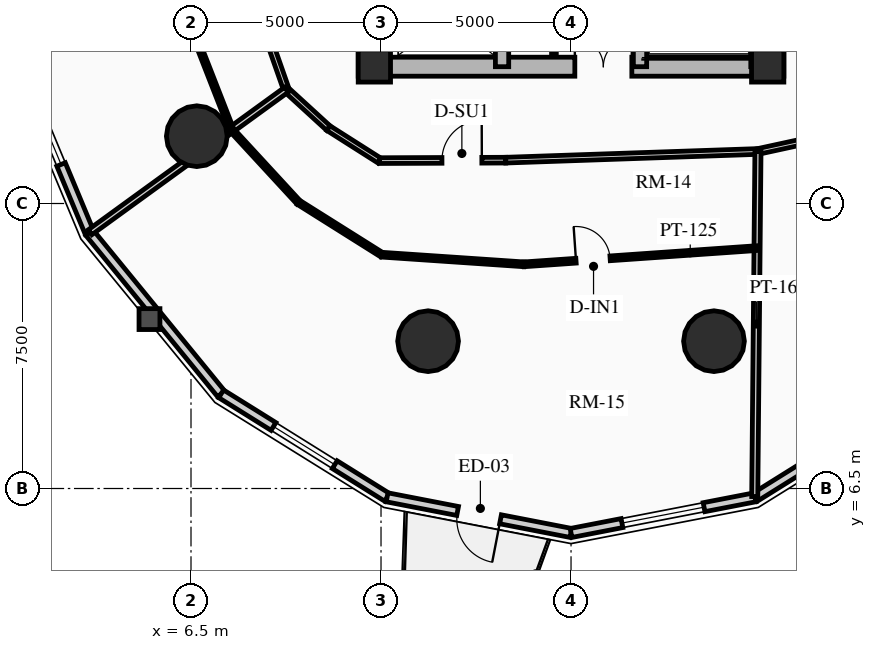
"""IFC4 building model, lengths in metres.
Left out: names, types, materials, properties, quantities, classifications, styles, units other than length and angle.
Written with IfcOpenShell. Run it as: python <this file> out.ifc"""

import sys

from ifc_helpers import new_model, si_unit, direction, frame, frame_2d, origin, origin_2d, place, context, subcontext, project, spatial, rectangle, circle, extrude, source, transform, mapped, element, fill, save


model = new_model("IFC4")
c1 = context("Model", 3, precision=1e-05, world=origin(), true_north=direction((0.0, 1.0)))
c2 = subcontext(c1, "Body", "Model", "MODEL_VIEW")
j1 = project(units=[si_unit("LENGTHUNIT", "METRE"), si_unit("PLANEANGLEUNIT", "RADIAN")], contexts=[c1])
p1 = place(None, origin())
s1 = spatial("IfcSite", under=j1, at=p1, CompositionType="ELEMENT")
p2 = place(p1, origin())
s2 = spatial("IfcBuilding", under=s1, at=p2, CompositionType="ELEMENT")
p3 = place(p2, frame((0.0, 0.0, 59.83)))
s3 = spatial("IfcBuildingStorey", under=s2, at=p3, CompositionType="ELEMENT", Elevation=59.83)
for number, where, z_axis, x_axis in (
    (1, (11.15, 17.35, 0.0), (0.0, 0.0, 1.0), (0.0, 1.0, 0.0)),
    (2, (21.85, 17.35, 0.0), (0.0, 0.0, 1.0), (0.0, 1.0, 0.0)),
):
    element("IfcWall", number, at=place(p3, frame(where, z_axis=z_axis, x_axis=x_axis)), inside=s3, PredefinedType="SHEAR", context=c2, shape_type="SweptSolid", body=[
        extrude(rectangle(XDim=14.3, YDim=0.5, at=frame_2d((7.15, 0.0))), origin(), (0.0, 0.0, 1.0), 2.91),
    ])
p4 = place(p3, frame((11.15, 17.6, 0.0), z_axis=(0.0, 0.0, 1.0), x_axis=(1.0, 0.0, 0.0)))
e3 = element("IfcWall", 3, at=p4, inside=s3, PredefinedType="SHEAR", context=c2, shape_type="SweptSolid", body=[
    extrude(rectangle(XDim=10.7, YDim=0.5, at=frame_2d((5.35, 0.0))), origin(), (0.0, 0.0, 1.0), 2.91),
])
m1 = source(origin(), c2, "Body", "SweptSolid", [
    extrude(rectangle(XDim=1.5, YDim=2.02, at=frame_2d((0.75, 1.01))), frame((0.0, 0.26, 0.0), z_axis=(0.0, -1.0, 0.0), x_axis=(1.0, 0.0, 0.0)), (0.0, 0.0, 1.0), 0.52),
])
p5 = place(p4, frame((5.45, 0.0, 0.0)))
e4 = element("IfcOpeningElement", 4, at=p5, cuts=e3, PredefinedType="OPENING", context=c2, shape_type="MappedRepresentation", body=[
    mapped(m1, transform((0.0, 0.0, 0.0), x_axis=(1.0, 0.0, 0.0), y_axis=(0.0, 1.0, 0.0), z_axis=(0.0, 0.0, 1.0), scale=1.0)),
])
p6 = place(p3, frame((14.685, 17.6, 0.0), z_axis=(0.0, 0.0, 1.0), x_axis=(0.0, 1.0, 0.0)))
e5 = element("IfcWall", 5, at=p6, inside=s3, PredefinedType="SHEAR", context=c2, shape_type="SweptSolid", body=[
    extrude(rectangle(XDim=13.8, YDim=0.35, at=frame_2d((6.9, 0.0))), origin(), (0.0, 0.0, 1.0), 2.91),
])
m2 = source(origin(), c2, "Body", "SweptSolid", [
    extrude(rectangle(XDim=1.1, YDim=2.015, at=frame_2d((0.55, 1.007))), frame((0.0, 0.185, 0.0), z_axis=(0.0, -1.0, 0.0), x_axis=(1.0, 0.0, 0.0)), (0.0, 0.0, 1.0), 0.37),
])
p7 = place(p6, frame((4.9, 0.0, 0.0)))
e6 = element("IfcOpeningElement", 6, at=p7, cuts=e5, PredefinedType="OPENING", context=c2, shape_type="MappedRepresentation", body=[
    mapped(m2, transform((0.0, 0.0, 0.0), x_axis=(1.0, 0.0, 0.0), y_axis=(0.0, 1.0, 0.0), z_axis=(0.0, 0.0, 1.0), scale=1.0)),
])
m3 = source(origin(), c2, "Body", "SweptSolid", [
    extrude(rectangle(XDim=1.15, YDim=2.02, at=frame_2d((0.575, 1.01))), frame((0.0, 0.185, 0.0), z_axis=(0.0, -1.0, 0.0), x_axis=(1.0, 0.0, 0.0)), (0.0, 0.0, 1.0), 0.37),
])
p8 = place(p6, frame((7.32, 0.0, 0.0)))
e7 = element("IfcOpeningElement", 7, at=p8, cuts=e5, PredefinedType="OPENING", context=c2, shape_type="MappedRepresentation", body=[
    mapped(m3, transform((0.0, 0.0, 0.0), x_axis=(1.0, 0.0, 0.0), y_axis=(0.0, 1.0, 0.0), z_axis=(0.0, 0.0, 1.0), scale=1.0)),
])
p9 = place(p3, frame((18.315, 17.6, 0.0), z_axis=(0.0, 0.0, 1.0), x_axis=(0.0, 1.0, 0.0)))
e8 = element("IfcWall", 8, at=p9, inside=s3, PredefinedType="SHEAR", context=c2, shape_type="SweptSolid", body=[
    extrude(rectangle(XDim=13.8, YDim=0.35, at=frame_2d((6.9, 0.0))), origin(), (0.0, 0.0, 1.0), 2.91),
])
p10 = place(p9, frame((10.025, 0.0, 0.0)))
e9 = element("IfcOpeningElement", 9, at=p10, cuts=e8, PredefinedType="OPENING", context=c2, shape_type="MappedRepresentation", body=[
    mapped(m2, transform((0.0, 0.0, 0.0), x_axis=(1.0, 0.0, 0.0), y_axis=(0.0, 1.0, 0.0), z_axis=(0.0, 0.0, 1.0), scale=1.0)),
])
p11 = place(p9, frame((12.025, 0.0, 0.0)))
e10 = element("IfcOpeningElement", 10, at=p11, cuts=e8, PredefinedType="OPENING", context=c2, shape_type="MappedRepresentation", body=[
    mapped(m2, transform((0.0, 0.0, 0.0), x_axis=(1.0, 0.0, 0.0), y_axis=(0.0, 1.0, 0.0), z_axis=(0.0, 0.0, 1.0), scale=1.0)),
])
p12 = place(p9, frame((5.33, 0.0, 0.0)))
e11 = element("IfcOpeningElement", 11, at=p12, cuts=e8, PredefinedType="OPENING", context=c2, shape_type="MappedRepresentation", body=[
    mapped(m3, transform((0.0, 0.0, 0.0), x_axis=(1.0, 0.0, 0.0), y_axis=(0.0, 1.0, 0.0), z_axis=(0.0, 0.0, 1.0), scale=1.0)),
])
p13 = place(p3, frame((21.405, 17.6, 0.0), z_axis=(0.0, 0.0, 1.0), x_axis=(0.0, 1.0, 0.0)))
e12 = element("IfcWall", 12, at=p13, inside=s3, PredefinedType="SHEAR", context=c2, shape_type="SweptSolid", body=[
    extrude(rectangle(XDim=6.745, YDim=0.35, at=frame_2d((3.373, 0.0))), origin(), (0.0, 0.0, 1.0), 2.91),
])
for number, where, z_axis, x_axis in (
    (13, (11.325, 17.62, 0.0), (0.0, 0.0, 1.0), (1.0, 0.0, 0.0)),
    (14, (21.675, 17.62, 0.0), (0.0, 0.0, 1.0), (1.0, 0.0, 0.0)),
):
    element("IfcColumn", number, at=place(p3, frame(where, z_axis=z_axis, x_axis=x_axis)), inside=s3, PredefinedType="COLUMN", context=c2, shape_type="SweptSolid", body=[
        extrude(rectangle(XDim=0.85, YDim=0.85, at=origin_2d()), origin(), (0.0, 0.0, 1.0), 2.91),
    ])
for number, where, z_axis, x_axis in (
    (15, (6.653, 15.771, 0.0), (0.0, 0.0, 1.0), (1.0, 0.0, 0.0)),
    (16, (12.739, 10.377, 0.0), (0.0, 0.0, 1.0), (1.0, 0.0, 0.0)),
    (17, (20.261, 10.377, 0.0), (0.0, 0.0, 1.0), (1.0, 0.0, 0.0)),
):
    element("IfcColumn", number, at=place(p3, frame(where, z_axis=z_axis, x_axis=x_axis)), inside=s3, PredefinedType="USERDEFINED", context=c2, shape_type="SweptSolid", body=[
        extrude(circle(Radius=0.8, at=origin_2d()), origin(), (0.0, 0.0, 1.0), 2.91),
    ])
p14 = place(p3, frame((3.828, 13.232, 0.0), z_axis=(0.0, 0.0, 1.0), x_axis=(-0.384348836956, 0.923187939442, 0.0)))
e18 = element("IfcWall", 18, at=p14, inside=s3, PredefinedType="SOLIDWALL", context=c2, shape_type="SweptSolid", body=[
    extrude(rectangle(XDim=5.789, YDim=0.24, at=frame_2d((2.894, 0.0))), origin(), (0.0, 0.0, 1.0), 2.073),
])
m4 = source(origin(), c2, "Body", "SweptSolid", [
    extrude(rectangle(XDim=1.9, YDim=1.35, at=frame_2d((0.95, 0.675))), frame((0.0, 0.13, 0.0), z_axis=(0.0, -1.0, 0.0), x_axis=(1.0, 0.0, 0.0)), (0.0, 0.0, 1.0), 0.26),
])
p15 = place(p14, frame((1.944, 0.0, 0.65)))
e19 = element("IfcOpeningElement", 19, at=p15, cuts=e18, PredefinedType="OPENING", context=c2, shape_type="MappedRepresentation", body=[
    mapped(m4, transform((0.0, 0.0, 0.0), x_axis=(1.0, 0.0, 0.0), y_axis=(0.0, 1.0, 0.0), z_axis=(0.0, 0.0, 1.0), scale=1.0)),
])
p16 = place(p3, frame((7.293, 8.991, 0.0), z_axis=(0.0, 0.0, 1.0), x_axis=(-0.632713287022, 0.77438614168, 0.0)))
e20 = element("IfcWall", 20, at=p16, inside=s3, PredefinedType="SOLIDWALL", context=c2, shape_type="SweptSolid", body=[
    extrude(rectangle(XDim=5.477, YDim=0.24, at=frame_2d((2.738, 0.0))), origin(), (0.0, 0.0, 1.0), 2.073),
])
p17 = place(p3, frame((11.66, 6.268, 0.0), z_axis=(0.0, 0.0, 1.0), x_axis=(-0.848533613342, 0.529141481107, 0.0)))
e21 = element("IfcWall", 21, at=p17, inside=s3, PredefinedType="SOLIDWALL", context=c2, shape_type="SweptSolid", body=[
    extrude(rectangle(XDim=5.146, YDim=0.24, at=frame_2d((2.573, 0.0))), origin(), (0.0, 0.0, 1.0), 2.073),
])
p18 = place(p17, frame((1.623, 0.0, 0.65)))
e22 = element("IfcOpeningElement", 22, at=p18, cuts=e21, PredefinedType="OPENING", context=c2, shape_type="MappedRepresentation", body=[
    mapped(m4, transform((0.0, 0.0, 0.0), x_axis=(1.0, 0.0, 0.0), y_axis=(0.0, 1.0, 0.0), z_axis=(0.0, 0.0, 1.0), scale=1.0)),
])
p19 = place(p3, frame((16.5, 5.33, 0.0), z_axis=(0.0, 0.0, 1.0), x_axis=(-0.981725274071, 0.190303668512, 0.0)))
e23 = element("IfcWall", 23, at=p19, inside=s3, PredefinedType="SOLIDWALL", context=c2, shape_type="SweptSolid", body=[
    extrude(rectangle(XDim=4.93, YDim=0.24, at=frame_2d((2.465, 0.0))), origin(), (0.0, 0.0, 1.0), 2.073),
])
m5 = source(origin(), c2, "Body", "SweptSolid", [
    extrude(rectangle(XDim=1.15, YDim=2.005, at=frame_2d((0.575, 1.002))), frame((0.0, 0.13, 0.0), z_axis=(0.0, -1.0, 0.0), x_axis=(1.0, 0.0, 0.0)), (0.0, 0.0, 1.0), 0.26),
])
p20 = place(p19, frame((1.89, 0.0, 0.0)))
e24 = element("IfcOpeningElement", 24, at=p20, cuts=e23, PredefinedType="OPENING", context=c2, shape_type="MappedRepresentation", body=[
    mapped(m5, transform((0.0, 0.0, 0.0), x_axis=(1.0, 0.0, 0.0), y_axis=(0.0, 1.0, 0.0), z_axis=(0.0, 0.0, 1.0), scale=1.0)),
])
p21 = place(p3, frame((21.34, 6.268, 0.0), z_axis=(0.0, 0.0, 1.0), x_axis=(-0.981725274071, -0.190303668512, 0.0)))
e25 = element("IfcWall", 25, at=p21, inside=s3, PredefinedType="SOLIDWALL", context=c2, shape_type="SweptSolid", body=[
    extrude(rectangle(XDim=4.93, YDim=0.24, at=frame_2d((2.465, 0.0))), origin(), (0.0, 0.0, 1.0), 2.073),
])
m6 = source(origin(), c2, "Body", "SweptSolid", [
    extrude(rectangle(XDim=2.2, YDim=1.35, at=frame_2d((1.1, 0.675))), frame((0.0, 0.13, 0.0), z_axis=(0.0, -1.0, 0.0), x_axis=(1.0, 0.0, 0.0)), (0.0, 0.0, 1.0), 0.26),
])
p22 = place(p21, frame((1.365, 0.0, 0.65)))
e26 = element("IfcOpeningElement", 26, at=p22, cuts=e25, PredefinedType="OPENING", context=c2, shape_type="MappedRepresentation", body=[
    mapped(m6, transform((0.0, 0.0, 0.0), x_axis=(1.0, 0.0, 0.0), y_axis=(0.0, 1.0, 0.0), z_axis=(0.0, 0.0, 1.0), scale=1.0)),
])
p23 = place(p3, frame((25.707, 8.991, 0.0), z_axis=(0.0, 0.0, 1.0), x_axis=(-0.848533613342, -0.529141481107, 0.0)))
e27 = element("IfcWall", 27, at=p23, inside=s3, PredefinedType="SOLIDWALL", context=c2, shape_type="SweptSolid", body=[
    extrude(rectangle(XDim=5.146, YDim=0.24, at=frame_2d((2.573, 0.0))), origin(), (0.0, 0.0, 1.0), 2.073),
])
p24 = place(p3, frame((16.05, 17.92, 0.0), z_axis=(0.0, 0.0, 1.0), x_axis=(0.0, 1.0, 0.0)))
e28 = element("IfcWall", 28, at=p24, inside=s3, PredefinedType="PARTITIONING", context=c2, shape_type="SweptSolid", body=[
    extrude(rectangle(XDim=1.8, YDim=0.125, at=frame_2d((0.9, 0.0))), origin(), (0.0, 0.0, 1.0), 2.635),
])
m7 = source(origin(), c2, "Body", "SweptSolid", [
    extrude(rectangle(XDim=0.9, YDim=2.005, at=frame_2d((0.45, 1.002))), frame((0.0, 0.073, 0.0), z_axis=(0.0, -1.0, 0.0), x_axis=(1.0, 0.0, 0.0)), (0.0, 0.0, 1.0), 0.145),
])
p25 = place(p24, frame((0.42, 0.0, 0.0)))
e29 = element("IfcOpeningElement", 29, at=p25, cuts=e28, PredefinedType="OPENING", context=c2, shape_type="MappedRepresentation", body=[
    mapped(m7, transform((0.0, 0.0, 0.0), x_axis=(1.0, 0.0, 0.0), y_axis=(0.0, 1.0, 0.0), z_axis=(0.0, 0.0, 1.0), scale=1.0)),
])
p26 = place(p3, frame((8.538, 18.338, 0.0), z_axis=(0.0, 0.0, 1.0), x_axis=(0.331358150167, -0.94350504838, 0.0)))
e30 = element("IfcWall", 30, at=p26, inside=s3, PredefinedType="PARTITIONING", context=c2, shape_type="SweptSolid", body=[
    extrude(rectangle(XDim=1.424, YDim=0.15, at=frame_2d((0.712, 0.0))), origin(), (0.0, 0.0, 1.0), 2.205),
])
p27 = place(p3, frame((9.01, 16.994, 0.0), z_axis=(0.0, 0.0, 1.0), x_axis=(0.737701798986, -0.67512669609, 0.0)))
e31 = element("IfcWall", 31, at=p27, inside=s3, PredefinedType="PARTITIONING", context=c2, shape_type="SweptSolid", body=[
    extrude(rectangle(XDim=1.498, YDim=0.15, at=frame_2d((0.749, 0.0))), origin(), (0.0, 0.0, 1.0), 2.159),
])
p28 = place(p3, frame((10.115, 15.983, 0.0), z_axis=(0.0, 0.0, 1.0), x_axis=(0.843995849351, -0.536349705209, 0.0)))
e32 = element("IfcWall", 32, at=p28, inside=s3, PredefinedType="PARTITIONING", context=c2, shape_type="SweptSolid", body=[
    extrude(rectangle(XDim=1.593, YDim=0.15, at=frame_2d((0.796, 0.0))), origin(), (0.0, 0.0, 1.0), 2.205),
])
p29 = place(p3, frame((11.46, 15.129, 0.0), z_axis=(0.0, 0.0, 1.0), x_axis=(0.999993513287, 0.003601858435, 0.0)))
e33 = element("IfcWall", 33, at=p29, inside=s3, PredefinedType="PARTITIONING", context=c2, shape_type="SweptSolid", body=[
    extrude(rectangle(XDim=3.321, YDim=0.15, at=frame_2d((1.661, 0.0))), origin(), (0.0, 0.0, 1.0), 2.159),
])
m8 = source(origin(), c2, "Body", "SweptSolid", [
    extrude(rectangle(XDim=1.05, YDim=2.015, at=frame_2d((0.525, 1.007))), frame((0.0, 0.085, 0.0), z_axis=(0.0, -1.0, 0.0), x_axis=(1.0, 0.0, 0.0)), (0.0, 0.0, 1.0), 0.17),
])
p30 = place(p29, frame((1.643, 0.0, 0.0)))
e34 = element("IfcOpeningElement", 34, at=p30, cuts=e33, PredefinedType="OPENING", context=c2, shape_type="MappedRepresentation", body=[
    mapped(m8, transform((0.0, 0.0, 0.0), x_axis=(1.0, 0.0, 0.0), y_axis=(0.0, 1.0, 0.0), z_axis=(0.0, 0.0, 1.0), scale=1.0)),
])
p31 = place(p3, frame((14.781, 15.141, 0.0), z_axis=(0.0, 0.0, 1.0), x_axis=(0.999407918707, 0.034406569513, 0.0)))
e35 = element("IfcWall", 35, at=p31, inside=s3, PredefinedType="PARTITIONING", context=c2, shape_type="SweptSolid", body=[
    extrude(rectangle(XDim=6.642, YDim=0.15, at=frame_2d((3.321, 0.0))), origin(), (0.0, 0.0, 1.0), 2.159),
])
p32 = place(p3, frame((21.419, 15.369, 0.0), z_axis=(0.0, 0.0, 1.0), x_axis=(0.977192701953, 0.212354475464, 0.0)))
e36 = element("IfcWall", 36, at=p32, inside=s3, PredefinedType="PARTITIONING", context=c2, shape_type="SweptSolid", body=[
    extrude(rectangle(XDim=1.888, YDim=0.15, at=frame_2d((0.944, 0.0))), origin(), (0.0, 0.0, 1.0), 2.205),
])
p33 = place(p3, frame((9.01, 16.994, 0.0), z_axis=(0.0, 0.0, 1.0), x_axis=(-0.809215422166, -0.58751204288, 0.0)))
e37 = element("IfcWall", 37, at=p33, inside=s3, PredefinedType="PARTITIONING", context=c2, shape_type="SweptSolid", body=[
    extrude(rectangle(XDim=6.384, YDim=0.16, at=frame_2d((3.192, 0.0))), origin(), (0.0, 0.0, 1.0), 2.073),
])
p34 = place(p3, frame((21.419, 15.369, 0.0), z_axis=(0.0, 0.0, 1.0), x_axis=(-0.009327801925, -0.999956495109, 0.0)))
e38 = element("IfcWall", 38, at=p34, inside=s3, PredefinedType="PARTITIONING", context=c2, shape_type="SweptSolid", body=[
    extrude(rectangle(XDim=9.082, YDim=0.16, at=frame_2d((4.541, 0.0))), origin(), (0.0, 0.0, 1.0), 2.073),
])
p35 = place(p3, frame((6.602, 18.406, 0.0), z_axis=(0.0, 0.0, 1.0), x_axis=(0.363943166681, -0.931421156849, 0.0)))
e39 = element("IfcWall", 39, at=p35, inside=s3, PredefinedType="PARTITIONING", context=c2, shape_type="SweptSolid", body=[
    extrude(rectangle(XDim=2.644, YDim=0.125, at=frame_2d((1.322, 0.0))), origin(), (0.0, 0.0, 1.0), 2.159),
])
p36 = place(p3, frame((7.564, 15.944, 0.0), z_axis=(0.0, 0.0, 1.0), x_axis=(0.677781429023, -0.735263445624, 0.0)))
e40 = element("IfcWall", 40, at=p36, inside=s3, PredefinedType="PARTITIONING", context=c2, shape_type="SweptSolid", body=[
    extrude(rectangle(XDim=2.604, YDim=0.125, at=frame_2d((1.302, 0.0))), origin(), (0.0, 0.0, 1.0), 2.635),
])
p37 = place(p3, frame((9.329, 14.03, 0.0), z_axis=(0.0, 0.0, 1.0), x_axis=(0.846499184235, -0.532390017834, 0.0)))
e41 = element("IfcWall", 41, at=p37, inside=s3, PredefinedType="PARTITIONING", context=c2, shape_type="SweptSolid", body=[
    extrude(rectangle(XDim=2.586, YDim=0.125, at=frame_2d((1.293, 0.0))), origin(), (0.0, 0.0, 1.0), 2.205),
])
p38 = place(p3, frame((11.518, 12.653, 0.0), z_axis=(0.0, 0.0, 1.0), x_axis=(0.997709106843, -0.067650115472, 0.0)))
e42 = element("IfcWall", 42, at=p38, inside=s3, PredefinedType="PARTITIONING", context=c2, shape_type="SweptSolid", body=[
    extrude(rectangle(XDim=3.753, YDim=0.125, at=frame_2d((1.876, 0.0))), origin(), (0.0, 0.0, 1.0), 2.159),
])
p39 = place(p3, frame((15.262, 12.399, 0.0), z_axis=(0.0, 0.0, 1.0), x_axis=(0.997584901562, 0.069457643027, 0.0)))
e43 = element("IfcWall", 43, at=p39, inside=s3, PredefinedType="PARTITIONING", context=c2, shape_type="SweptSolid", body=[
    extrude(rectangle(XDim=6.148, YDim=0.125, at=frame_2d((3.074, 0.0))), origin(), (0.0, 0.0, 1.0), 2.159),
])
p40 = place(p39, frame((1.372, 0.0, 0.0)))
e44 = element("IfcOpeningElement", 44, at=p40, cuts=e43, PredefinedType="OPENING", context=c2, shape_type="MappedRepresentation", body=[
    mapped(m7, transform((0.0, 0.0, 0.0), x_axis=(1.0, 0.0, 0.0), y_axis=(0.0, 1.0, 0.0), z_axis=(0.0, 0.0, 1.0), scale=1.0)),
])
m9 = source(origin(), c2, "Body", "SweptSolid", [
    extrude(rectangle(XDim=1.9, YDim=1.35, at=frame_2d((0.95, 0.675))), frame((0.0, 0.03, 0.0), z_axis=(0.0, -1.0, 0.0), x_axis=(1.0, 0.0, 0.0)), (0.0, 0.0, 1.0), 0.06),
])
p41 = place(p15, origin())
e45 = element("IfcWindow", 45, at=p41, inside=s3, PartitioningType="DOUBLE_PANEL_VERTICAL", PredefinedType="WINDOW", context=c2, shape_type="MappedRepresentation", body=[
    mapped(m9, transform((0.0, 0.0, 0.0), x_axis=(1.0, 0.0, 0.0), y_axis=(0.0, 1.0, 0.0), z_axis=(0.0, 0.0, 1.0), scale=1.0)),
])
fill(e19, e45)
p42 = place(p18, origin())
e46 = element("IfcWindow", 46, at=p42, inside=s3, PartitioningType="DOUBLE_PANEL_VERTICAL", PredefinedType="WINDOW", context=c2, shape_type="MappedRepresentation", body=[
    mapped(m9, transform((0.0, 0.0, 0.0), x_axis=(1.0, 0.0, 0.0), y_axis=(0.0, 1.0, 0.0), z_axis=(0.0, 0.0, 1.0), scale=1.0)),
])
fill(e22, e46)
m10 = source(origin(), c2, "Body", "SweptSolid", [
    extrude(rectangle(XDim=1.15, YDim=2.005, at=frame_2d((0.575, 1.002))), frame((0.0, 0.025, 0.0), z_axis=(0.0, -1.0, 0.0), x_axis=(1.0, 0.0, 0.0)), (0.0, 0.0, 1.0), 0.05),
])
p43 = place(p20, origin())
e47 = element("IfcDoor", 47, at=p43, inside=s3, OperationType="SINGLE_SWING_LEFT", PredefinedType="DOOR", context=c2, shape_type="MappedRepresentation", body=[
    mapped(m10, transform((0.0, 0.0, 0.0), x_axis=(1.0, 0.0, 0.0), y_axis=(0.0, 1.0, 0.0), z_axis=(0.0, 0.0, 1.0), scale=1.0)),
])
fill(e24, e47)
m11 = source(origin(), c2, "Body", "SweptSolid", [
    extrude(rectangle(XDim=2.2, YDim=1.35, at=frame_2d((1.1, 0.675))), frame((0.0, 0.03, 0.0), z_axis=(0.0, -1.0, 0.0), x_axis=(1.0, 0.0, 0.0)), (0.0, 0.0, 1.0), 0.06),
])
p44 = place(p22, origin())
e48 = element("IfcWindow", 48, at=p44, inside=s3, PartitioningType="DOUBLE_PANEL_VERTICAL", PredefinedType="WINDOW", context=c2, shape_type="MappedRepresentation", body=[
    mapped(m11, transform((0.0, 0.0, 0.0), x_axis=(1.0, 0.0, 0.0), y_axis=(0.0, 1.0, 0.0), z_axis=(0.0, 0.0, 1.0), scale=1.0)),
])
fill(e26, e48)
m12 = source(origin(), c2, "Body", "SweptSolid", [
    extrude(rectangle(XDim=1.5, YDim=2.02, at=frame_2d((0.75, 1.01))), frame((0.0, 0.025, 0.0), z_axis=(0.0, -1.0, 0.0), x_axis=(1.0, 0.0, 0.0)), (0.0, 0.0, 1.0), 0.05),
])
p45 = place(p5, origin())
e49 = element("IfcDoor", 49, at=p45, inside=s3, OperationType="DOUBLE_DOOR_SINGLE_SWING", PredefinedType="DOOR", context=c2, shape_type="MappedRepresentation", body=[
    mapped(m12, transform((0.0, 0.0, 0.0), x_axis=(1.0, 0.0, 0.0), y_axis=(0.0, 1.0, 0.0), z_axis=(0.0, 0.0, 1.0), scale=1.0)),
])
fill(e4, e49)
m13 = source(origin(), c2, "Body", "SweptSolid", [
    extrude(rectangle(XDim=1.05, YDim=2.015, at=frame_2d((0.525, 1.007))), frame((0.0, 0.025, 0.0), z_axis=(0.0, -1.0, 0.0), x_axis=(1.0, 0.0, 0.0)), (0.0, 0.0, 1.0), 0.05),
])
p46 = place(p30, origin())
e50 = element("IfcDoor", 50, at=p46, inside=s3, OperationType="SINGLE_SWING_RIGHT", PredefinedType="DOOR", context=c2, shape_type="MappedRepresentation", body=[
    mapped(m13, transform((0.0, 0.0, 0.0), x_axis=(1.0, 0.0, 0.0), y_axis=(0.0, 1.0, 0.0), z_axis=(0.0, 0.0, 1.0), scale=1.0)),
])
fill(e34, e50)
m14 = source(origin(), c2, "Body", "SweptSolid", [
    extrude(rectangle(XDim=0.9, YDim=2.005, at=frame_2d((0.45, 1.002))), frame((0.0, 0.025, 0.0), z_axis=(0.0, -1.0, 0.0), x_axis=(1.0, 0.0, 0.0)), (0.0, 0.0, 1.0), 0.05),
])
p47 = place(p40, origin())
e51 = element("IfcDoor", 51, at=p47, inside=s3, OperationType="SINGLE_SWING_LEFT", PredefinedType="DOOR", context=c2, shape_type="MappedRepresentation", body=[
    mapped(m14, transform((0.0, 0.0, 0.0), x_axis=(1.0, 0.0, 0.0), y_axis=(0.0, 1.0, 0.0), z_axis=(0.0, 0.0, 1.0), scale=1.0)),
])
fill(e44, e51)
save(model, sys.argv[1])
